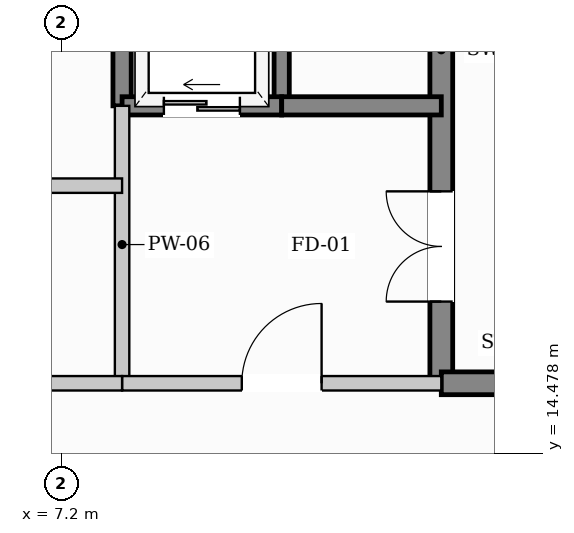
"""IFC4 building model, lengths in metres.
Left out: names, types, materials, properties, quantities, classifications, styles, units other than length and angle.
Written with IfcOpenShell. Run it as: python <this file> out.ifc"""

import sys

from ifc_helpers import new_model, si_unit, direction, frame, frame_2d, origin, place, context, subcontext, project, spatial, rectangle, extrude, element, fill, save


model = new_model("IFC4")
c1 = context("Model", 3, precision=1e-05, world=origin(), true_north=direction((0.0, 1.0)))
c2 = subcontext(c1, "Body", "Model", "MODEL_VIEW")
j1 = project(units=[si_unit("LENGTHUNIT", "METRE"), si_unit("PLANEANGLEUNIT", "RADIAN")], contexts=[c1])
p1 = place(None, origin())
s1 = spatial("IfcSite", under=j1, at=p1, CompositionType="ELEMENT")
p2 = place(p1, origin())
s2 = spatial("IfcBuilding", under=s1, at=p2, CompositionType="ELEMENT")
p3 = place(p2, origin())
s3 = spatial("IfcBuildingStorey", under=s2, at=p3, CompositionType="ELEMENT", Elevation=0.0)
p4 = place(p3, frame((12.2, 15.4, 0.0), z_axis=(0.0, 0.0, 1.0), x_axis=(0.0, 1.0, 0.0)))
e1 = element("IfcWall", 1, at=p4, inside=s3, PredefinedType="SHEAR", context=c2, shape_type="SweptSolid", body=[
    extrude(rectangle(XDim=6.0, YDim=0.3, at=frame_2d((3.0, 0.0))), origin(), (0.0, 0.0, 1.0), 4.78),
])
p5 = place(p4, frame((1.075, 0.0, 0.0)))
e2 = element("IfcOpeningElement", 2, at=p5, cuts=e1, PredefinedType="OPENING", context=c2, shape_type="SweptSolid", body=[
    extrude(rectangle(XDim=1.45, YDim=2.2, at=frame_2d((0.725, 1.1))), frame((0.0, 0.16, 0.0), z_axis=(0.0, -1.0, 0.0), x_axis=(1.0, 0.0, 0.0)), (0.0, 0.0, 1.0), 0.32),
])
p6 = place(p3, frame((12.2, 15.4, 0.0), z_axis=(0.0, 0.0, 1.0), x_axis=(1.0, 0.0, 0.0)))
e3 = element("IfcWall", 3, at=p6, inside=s3, PredefinedType="SHEAR", context=c2, shape_type="SweptSolid", body=[
    extrude(rectangle(XDim=7.0, YDim=0.3, at=frame_2d((3.5, 0.0))), origin(), (0.0, 0.0, 1.0), 4.78),
])
p7 = place(p3, frame((8.0, 19.05, 0.0), z_axis=(0.0, 0.0, 1.0), x_axis=(0.0, 1.0, 0.0)))
e4 = element("IfcWall", 4, at=p7, inside=s3, PredefinedType="SHEAR", context=c2, shape_type="SweptSolid", body=[
    extrude(rectangle(XDim=2.35, YDim=0.24, at=frame_2d((1.175, 0.0))), origin(), (0.0, 0.0, 1.0), 4.78),
])
p8 = place(p3, frame((10.1, 19.05, 0.0), z_axis=(0.0, 0.0, 1.0), x_axis=(0.0, 1.0, 0.0)))
e5 = element("IfcWall", 5, at=p8, inside=s3, PredefinedType="SHEAR", context=c2, shape_type="SweptSolid", body=[
    extrude(rectangle(XDim=2.35, YDim=0.2, at=frame_2d((1.175, 0.0))), origin(), (0.0, 0.0, 1.0), 4.78),
])
p9 = place(p3, frame((8.0, 19.05, 0.0), z_axis=(0.0, 0.0, 1.0), x_axis=(1.0, 0.0, 0.0)))
e6 = element("IfcWall", 6, at=p9, inside=s3, PredefinedType="SHEAR", context=c2, shape_type="SweptSolid", body=[
    extrude(rectangle(XDim=2.1, YDim=0.24, at=frame_2d((1.05, 0.0))), origin(), (0.0, 0.0, 1.0), 4.78),
])
p10 = place(p9, frame((0.55, 0.0, 0.0)))
e7 = element("IfcOpeningElement", 7, at=p10, cuts=e6, PredefinedType="OPENING", context=c2, shape_type="SweptSolid", body=[
    extrude(rectangle(XDim=1.0, YDim=2.1, at=frame_2d((0.5, 1.05))), frame((0.0, 0.13, 0.0), z_axis=(0.0, -1.0, 0.0), x_axis=(1.0, 0.0, 0.0)), (0.0, 0.0, 1.0), 0.26),
])
p11 = place(p3, frame((10.1, 19.05, 0.0), z_axis=(0.0, 0.0, 1.0), x_axis=(1.0, 0.0, 0.0)))
e8 = element("IfcWall", 8, at=p11, inside=s3, PredefinedType="SHEAR", context=c2, shape_type="SweptSolid", body=[
    extrude(rectangle(XDim=2.1, YDim=0.24, at=frame_2d((1.05, 0.0))), origin(), (0.0, 0.0, 1.0), 4.78),
])
p12 = place(p3, frame((8.0, 15.4, 0.0), z_axis=(0.0, 0.0, 1.0), x_axis=(0.0, 1.0, 0.0)))
e9 = element("IfcWall", 9, at=p12, inside=s3, PredefinedType="PARTITIONING", context=c2, shape_type="SweptSolid", body=[
    extrude(rectangle(XDim=3.65, YDim=0.19, at=frame_2d((1.825, 0.0))), origin(), (0.0, 0.0, 1.0), 4.78),
])
p13 = place(p3, frame((8.0, 15.4, 0.0), z_axis=(0.0, 0.0, 1.0), x_axis=(1.0, 0.0, 0.0)))
e10 = element("IfcWall", 10, at=p13, inside=s3, PredefinedType="PARTITIONING", context=c2, shape_type="SweptSolid", body=[
    extrude(rectangle(XDim=4.2, YDim=0.19, at=frame_2d((2.1, 0.0))), origin(), (0.0, 0.0, 1.0), 4.78),
])
p14 = place(p13, frame((1.575, 0.0, 0.0)))
e11 = element("IfcOpeningElement", 11, at=p14, cuts=e10, PredefinedType="OPENING", context=c2, shape_type="SweptSolid", body=[
    extrude(rectangle(XDim=1.05, YDim=2.15, at=frame_2d((0.525, 1.075))), frame((0.0, 0.105, 0.0), z_axis=(0.0, -1.0, 0.0), x_axis=(1.0, 0.0, 0.0)), (0.0, 0.0, 1.0), 0.21),
])
p15 = place(p3, frame((0.85, 15.4, 0.0), z_axis=(0.0, 0.0, 1.0), x_axis=(1.0, 0.0, 0.0)))
e12 = element("IfcWall", 12, at=p15, inside=s3, PredefinedType="PARTITIONING", context=c2, shape_type="SweptSolid", body=[
    extrude(rectangle(XDim=7.15, YDim=0.19, at=frame_2d((3.575, 0.0))), origin(), (0.0, 0.0, 1.0), 3.88),
])
p16 = place(p3, frame((0.85, 18.0, 0.0), z_axis=(0.0, 0.0, 1.0), x_axis=(1.0, 0.0, 0.0)))
e13 = element("IfcWall", 13, at=p16, inside=s3, PredefinedType="PARTITIONING", context=c2, shape_type="SweptSolid", body=[
    extrude(rectangle(XDim=7.15, YDim=0.19, at=frame_2d((3.575, 0.0))), origin(), (0.0, 0.0, 1.0), 3.88),
])
p17 = place(p16, frame((2.8, 0.0, 0.0)))
e14 = element("IfcOpeningElement", 14, at=p17, cuts=e13, PredefinedType="OPENING", context=c2, shape_type="SweptSolid", body=[
    extrude(rectangle(XDim=1.05, YDim=2.15, at=frame_2d((0.525, 1.075))), frame((0.0, 0.105, 0.0), z_axis=(0.0, -1.0, 0.0), x_axis=(1.0, 0.0, 0.0)), (0.0, 0.0, 1.0), 0.21),
])
p18 = place(p5, origin())
e15 = element("IfcDoor", 15, at=p18, inside=s3, OperationType="DOUBLE_DOOR_SINGLE_SWING", PredefinedType="DOOR", context=c2, shape_type="SweptSolid", body=[
    extrude(rectangle(XDim=1.45, YDim=2.2, at=frame_2d((0.725, 1.1))), frame((0.0, 0.025, 0.0), z_axis=(0.0, -1.0, 0.0), x_axis=(1.0, 0.0, 0.0)), (0.0, 0.0, 1.0), 0.05),
])
fill(e2, e15)
p19 = place(p10, origin())
e16 = element("IfcDoor", 16, at=p19, inside=s3, OperationType="SLIDING_TO_LEFT", PredefinedType="DOOR", context=c2, shape_type="SweptSolid", body=[
    extrude(rectangle(XDim=1.0, YDim=2.1, at=frame_2d((0.5, 1.05))), frame((0.0, 0.025, 0.0), z_axis=(0.0, -1.0, 0.0), x_axis=(1.0, 0.0, 0.0)), (0.0, 0.0, 1.0), 0.05),
])
fill(e7, e16)
p20 = place(p14, origin())
e17 = element("IfcDoor", 17, at=p20, inside=s3, OperationType="SINGLE_SWING_RIGHT", PredefinedType="DOOR", context=c2, shape_type="SweptSolid", body=[
    extrude(rectangle(XDim=1.05, YDim=2.15, at=frame_2d((0.525, 1.075))), frame((0.0, 0.025, 0.0), z_axis=(0.0, -1.0, 0.0), x_axis=(1.0, 0.0, 0.0)), (0.0, 0.0, 1.0), 0.05),
])
fill(e11, e17)
save(model, sys.argv[1])
